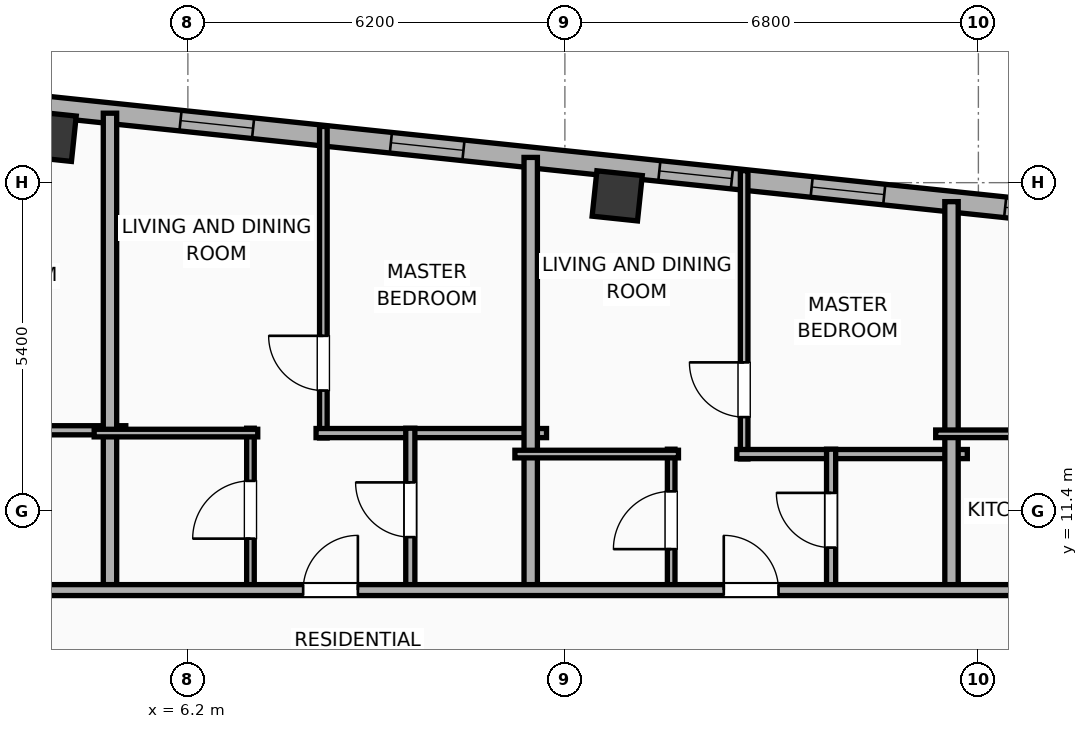
"""IFC4 building model, lengths in metres.
Left out: names, types, materials, properties, quantities, classifications, styles, units other than length and angle.
Written with IfcOpenShell. Run it as: python <this file> out.ifc"""

import sys

from ifc_helpers import new_model, si_unit, direction, frame, frame_2d, origin, origin_2d, place, context, subcontext, project, spatial, rectangle, hollow_rectangle, extrude, element, fill, save


model = new_model("IFC4")
c1 = context("Model", 3, precision=1e-05, world=origin(), true_north=direction((0.0, 1.0)))
c2 = subcontext(c1, "Body", "Model", "MODEL_VIEW")
j1 = project(units=[si_unit("LENGTHUNIT", "METRE"), si_unit("PLANEANGLEUNIT", "RADIAN")], contexts=[c1])
p1 = place(None, origin())
s1 = spatial("IfcSite", under=j1, at=p1, CompositionType="ELEMENT")
p2 = place(p1, origin())
s2 = spatial("IfcBuilding", under=s1, at=p2, CompositionType="ELEMENT")
p3 = place(p2, frame((0.0, 0.0, 271.7)))
s3 = spatial("IfcBuildingStorey", under=s2, at=p3, CompositionType="ELEMENT", Elevation=271.7)
for number, where, z_axis, x_axis in (
    (1, (13.26, 16.583, 0.0), (0.0, 0.0, 1.0), (0.995, -0.105, 0.0)),
    (2, (3.952, 17.561, 0.0), (0.0, 0.0, 1.0), (0.995, -0.105, 0.0)),
):
    element("IfcColumn", number, at=place(p3, frame(where, z_axis=z_axis, x_axis=x_axis)), inside=s3, PredefinedType="COLUMN", context=c2, shape_type="SweptSolid", body=[
        extrude(hollow_rectangle(XDim=0.75, YDim=0.75, WallThickness=0.025, at=origin_2d()), origin(), (0.0, 0.0, 1.0), 3.9),
    ])
p4 = place(p3, frame((-23.908, 20.972, 0.0), z_axis=(0.0, 0.0, 1.0), x_axis=(0.994521888554, -0.104528528102, 0.0)))
e3 = element("IfcWall", 3, at=p4, inside=s3, PredefinedType="ELEMENTEDWALL", context=c2, shape_type="SweptSolid", body=[
    extrude(rectangle(XDim=46.766, YDim=0.34, at=frame_2d((23.383, 0.0))), origin(), (0.0, 0.0, 1.0), 3.65),
])
p5 = place(p4, frame((5.744, 0.0, 0.75)))
e4 = element("IfcOpeningElement", 4, at=p5, cuts=e3, PredefinedType="OPENING", context=c2, shape_type="SweptSolid", body=[
    extrude(rectangle(XDim=2.4, YDim=2.1, at=frame_2d((1.2, 1.05))), frame((0.0, 0.18, 0.0), z_axis=(0.0, -1.0, 0.0), x_axis=(1.0, 0.0, 0.0)), (0.0, 0.0, 1.0), 0.36),
])
p6 = place(p4, frame((3.05, 0.0, 0.75)))
e5 = element("IfcOpeningElement", 5, at=p6, cuts=e3, PredefinedType="OPENING", context=c2, shape_type="SweptSolid", body=[
    extrude(rectangle(XDim=1.2, YDim=2.05, at=frame_2d((0.6, 1.025))), frame((0.0, 0.18, 0.0), z_axis=(0.0, -1.0, 0.0), x_axis=(1.0, 0.0, 0.0)), (0.0, 0.0, 1.0), 0.36),
])
p7 = place(p4, frame((9.957, 0.0, 0.75)))
e6 = element("IfcOpeningElement", 6, at=p7, cuts=e3, PredefinedType="OPENING", context=c2, shape_type="SweptSolid", body=[
    extrude(rectangle(XDim=1.2, YDim=2.05, at=frame_2d((0.6, 1.025))), frame((0.0, 0.18, 0.0), z_axis=(0.0, -1.0, 0.0), x_axis=(1.0, 0.0, 0.0)), (0.0, 0.0, 1.0), 0.36),
])
p8 = place(p4, frame((13.05, 0.0, 0.75)))
e7 = element("IfcOpeningElement", 7, at=p8, cuts=e3, PredefinedType="OPENING", context=c2, shape_type="SweptSolid", body=[
    extrude(rectangle(XDim=1.2, YDim=2.05, at=frame_2d((0.6, 1.025))), frame((0.0, 0.18, 0.0), z_axis=(0.0, -1.0, 0.0), x_axis=(1.0, 0.0, 0.0)), (0.0, 0.0, 1.0), 0.36),
])
p9 = place(p4, frame((16.383, 0.0, 0.75)))
e8 = element("IfcOpeningElement", 8, at=p9, cuts=e3, PredefinedType="OPENING", context=c2, shape_type="SweptSolid", body=[
    extrude(rectangle(XDim=1.2, YDim=2.05, at=frame_2d((0.6, 1.025))), frame((0.0, 0.18, 0.0), z_axis=(0.0, -1.0, 0.0), x_axis=(1.0, 0.0, 0.0)), (0.0, 0.0, 1.0), 0.36),
])
p10 = place(p4, frame((19.716, 0.0, 0.75)))
e9 = element("IfcOpeningElement", 9, at=p10, cuts=e3, PredefinedType="OPENING", context=c2, shape_type="SweptSolid", body=[
    extrude(rectangle(XDim=1.2, YDim=2.05, at=frame_2d((0.6, 1.025))), frame((0.0, 0.18, 0.0), z_axis=(0.0, -1.0, 0.0), x_axis=(1.0, 0.0, 0.0)), (0.0, 0.0, 1.0), 0.36),
])
p11 = place(p4, frame((23.195, 0.0, 0.75)))
e10 = element("IfcOpeningElement", 10, at=p11, cuts=e3, PredefinedType="OPENING", context=c2, shape_type="SweptSolid", body=[
    extrude(rectangle(XDim=1.2, YDim=2.05, at=frame_2d((0.6, 1.025))), frame((0.0, 0.18, 0.0), z_axis=(0.0, -1.0, 0.0), x_axis=(1.0, 0.0, 0.0)), (0.0, 0.0, 1.0), 0.36),
])
p12 = place(p4, frame((26.194, 0.0, 0.75)))
e11 = element("IfcOpeningElement", 11, at=p12, cuts=e3, PredefinedType="OPENING", context=c2, shape_type="SweptSolid", body=[
    extrude(rectangle(XDim=1.2, YDim=2.05, at=frame_2d((0.6, 1.025))), frame((0.0, 0.18, 0.0), z_axis=(0.0, -1.0, 0.0), x_axis=(1.0, 0.0, 0.0)), (0.0, 0.0, 1.0), 0.36),
])
p13 = place(p4, frame((30.152, 0.0, 0.75)))
e12 = element("IfcOpeningElement", 12, at=p13, cuts=e3, PredefinedType="OPENING", context=c2, shape_type="SweptSolid", body=[
    extrude(rectangle(XDim=1.2, YDim=2.05, at=frame_2d((0.6, 1.025))), frame((0.0, 0.18, 0.0), z_axis=(0.0, -1.0, 0.0), x_axis=(1.0, 0.0, 0.0)), (0.0, 0.0, 1.0), 0.36),
])
p14 = place(p4, frame((33.631, 0.0, 0.75)))
e13 = element("IfcOpeningElement", 13, at=p14, cuts=e3, PredefinedType="OPENING", context=c2, shape_type="SweptSolid", body=[
    extrude(rectangle(XDim=1.2, YDim=2.05, at=frame_2d((0.6, 1.025))), frame((0.0, 0.18, 0.0), z_axis=(0.0, -1.0, 0.0), x_axis=(1.0, 0.0, 0.0)), (0.0, 0.0, 1.0), 0.36),
])
p15 = place(p4, frame((38.07, 0.0, 0.75)))
e14 = element("IfcOpeningElement", 14, at=p15, cuts=e3, PredefinedType="OPENING", context=c2, shape_type="SweptSolid", body=[
    extrude(rectangle(XDim=1.2, YDim=2.05, at=frame_2d((0.6, 1.025))), frame((0.0, 0.18, 0.0), z_axis=(0.0, -1.0, 0.0), x_axis=(1.0, 0.0, 0.0)), (0.0, 0.0, 1.0), 0.36),
])
p16 = place(p4, frame((40.589, 0.0, 0.75)))
e15 = element("IfcOpeningElement", 15, at=p16, cuts=e3, PredefinedType="OPENING", context=c2, shape_type="SweptSolid", body=[
    extrude(rectangle(XDim=1.2, YDim=2.05, at=frame_2d((0.6, 1.025))), frame((0.0, 0.18, 0.0), z_axis=(0.0, -1.0, 0.0), x_axis=(1.0, 0.0, 0.0)), (0.0, 0.0, 1.0), 0.36),
])
p17 = place(p4, frame((43.789, 0.0, 0.75)))
e16 = element("IfcOpeningElement", 16, at=p17, cuts=e3, PredefinedType="OPENING", context=c2, shape_type="SweptSolid", body=[
    extrude(rectangle(XDim=1.2, YDim=2.05, at=frame_2d((0.6, 1.025))), frame((0.0, 0.18, 0.0), z_axis=(0.0, -1.0, 0.0), x_axis=(1.0, 0.0, 0.0)), (0.0, 0.0, 1.0), 0.36),
])
p18 = place(p3, frame((1.389, 12.728, 0.0), z_axis=(0.0, 0.0, 1.0), x_axis=(1.0, 0.0, 0.0)))
e17 = element("IfcWall", 17, at=p18, inside=s3, PredefinedType="PLUMBINGWALL", context=c2, shape_type="SweptSolid", body=[
    extrude(rectangle(XDim=3.79, YDim=0.15, at=frame_2d((1.895, 0.0))), origin(), (0.0, 0.0, 1.0), 3.65),
])
p19 = place(p3, frame((4.919, 10.02, 0.0), z_axis=(0.0, 0.0, 1.0), x_axis=(0.0, 1.0, 0.0)))
e18 = element("IfcWall", 18, at=p19, inside=s3, PredefinedType="PARTITIONING", context=c2, shape_type="SweptSolid", body=[
    extrude(rectangle(XDim=7.922, YDim=0.22, at=frame_2d((3.961, 0.0))), origin(), (0.0, 0.0, 1.0), 3.65),
])
p20 = place(p3, frame((8.428, 12.602, 0.0), z_axis=(0.0, 0.0, 1.0), x_axis=(0.0, 1.0, 0.0)))
e19 = element("IfcWall", 19, at=p20, inside=s3, PredefinedType="PARTITIONING", context=c2, shape_type="SweptSolid", body=[
    extrude(rectangle(XDim=5.122, YDim=0.125, at=frame_2d((2.561, 0.0))), origin(), (0.0, 0.0, 1.0), 3.65),
])
p21 = place(p20, frame((0.779, 0.0, 0.0)))
e20 = element("IfcOpeningElement", 20, at=p21, cuts=e19, PredefinedType="OPENING", context=c2, shape_type="SweptSolid", body=[
    extrude(rectangle(XDim=0.9, YDim=2.05, at=frame_2d((0.45, 1.025))), frame((0.0, 0.073, 0.0), z_axis=(0.0, -1.0, 0.0), x_axis=(1.0, 0.0, 0.0)), (0.0, 0.0, 1.0), 0.145),
])
p22 = place(p3, frame((8.308, 12.682, 0.0), z_axis=(0.0, 0.0, 1.0), x_axis=(1.0, 0.0, 0.0)))
e21 = element("IfcWall", 21, at=p22, inside=s3, PredefinedType="PLUMBINGWALL", context=c2, shape_type="SweptSolid", body=[
    extrude(rectangle(XDim=3.79, YDim=0.15, at=frame_2d((1.895, 0.0))), origin(), (0.0, 0.0, 1.0), 3.65),
])
p23 = place(p3, frame((7.229, 10.08, 0.0), z_axis=(0.0, 0.0, 1.0), x_axis=(0.0, 1.0, 0.0)))
e22 = element("IfcWall", 22, at=p23, inside=s3, PredefinedType="PARTITIONING", context=c2, shape_type="SweptSolid", body=[
    extrude(rectangle(XDim=2.682, YDim=0.125, at=frame_2d((1.341, 0.0))), origin(), (0.0, 0.0, 1.0), 3.65),
])
p24 = place(p23, frame((0.866, 0.0, 0.0)))
e23 = element("IfcOpeningElement", 23, at=p24, cuts=e22, PredefinedType="OPENING", context=c2, shape_type="SweptSolid", body=[
    extrude(rectangle(XDim=0.95, YDim=2.05, at=frame_2d((0.475, 1.025))), frame((0.0, 0.073, 0.0), z_axis=(0.0, -1.0, 0.0), x_axis=(1.0, 0.0, 0.0)), (0.0, 0.0, 1.0), 0.145),
])
p25 = place(p3, frame((4.659, 12.682, 0.0), z_axis=(0.0, 0.0, 1.0), x_axis=(1.0, 0.0, 0.0)))
e24 = element("IfcWall", 24, at=p25, inside=s3, PredefinedType="PARTITIONING", context=c2, shape_type="SweptSolid", body=[
    extrude(rectangle(XDim=2.69, YDim=0.125, at=frame_2d((1.345, 0.0))), origin(), (0.0, 0.0, 1.0), 3.65),
])
p26 = place(p3, frame((9.858, 10.08, 0.0), z_axis=(0.0, 0.0, 1.0), x_axis=(0.0, 1.0, 0.0)))
e25 = element("IfcWall", 25, at=p26, inside=s3, PredefinedType="PLUMBINGWALL", context=c2, shape_type="SweptSolid", body=[
    extrude(rectangle(XDim=2.682, YDim=0.15, at=frame_2d((1.341, 0.0))), origin(), (0.0, 0.0, 1.0), 3.65),
])
p27 = place(p26, frame((0.891, 0.0, 0.0)))
e26 = element("IfcOpeningElement", 26, at=p27, cuts=e25, PredefinedType="OPENING", context=c2, shape_type="SweptSolid", body=[
    extrude(rectangle(XDim=0.9, YDim=2.05, at=frame_2d((0.45, 1.025))), frame((0.0, 0.085, 0.0), z_axis=(0.0, -1.0, 0.0), x_axis=(1.0, 0.0, 0.0)), (0.0, 0.0, 1.0), 0.17),
])
p28 = place(p3, frame((11.838, 10.02, 0.0), z_axis=(0.0, 0.0, 1.0), x_axis=(0.0, 1.0, 0.0)))
e27 = element("IfcWall", 27, at=p28, inside=s3, PredefinedType="PARTITIONING", context=c2, shape_type="SweptSolid", body=[
    extrude(rectangle(XDim=7.195, YDim=0.22, at=frame_2d((3.598, 0.0))), origin(), (0.0, 0.0, 1.0), 3.65),
])
p29 = place(p3, frame((15.348, 12.257, 0.0), z_axis=(0.0, 0.0, 1.0), x_axis=(0.0, 1.0, 0.0)))
e28 = element("IfcWall", 28, at=p29, inside=s3, PredefinedType="PARTITIONING", context=c2, shape_type="SweptSolid", body=[
    extrude(rectangle(XDim=4.74, YDim=0.125, at=frame_2d((2.37, 0.0))), origin(), (0.0, 0.0, 1.0), 3.65),
])
p30 = place(p29, frame((0.688, 0.0, 0.0)))
e29 = element("IfcOpeningElement", 29, at=p30, cuts=e28, PredefinedType="OPENING", context=c2, shape_type="SweptSolid", body=[
    extrude(rectangle(XDim=0.9, YDim=2.05, at=frame_2d((0.45, 1.025))), frame((0.0, 0.073, 0.0), z_axis=(0.0, -1.0, 0.0), x_axis=(1.0, 0.0, 0.0)), (0.0, 0.0, 1.0), 0.145),
])
p31 = place(p3, frame((15.228, 12.337, 0.0), z_axis=(0.0, 0.0, 1.0), x_axis=(1.0, 0.0, 0.0)))
e30 = element("IfcWall", 30, at=p31, inside=s3, PredefinedType="PLUMBINGWALL", context=c2, shape_type="SweptSolid", body=[
    extrude(rectangle(XDim=3.79, YDim=0.15, at=frame_2d((1.895, 0.0))), origin(), (0.0, 0.0, 1.0), 3.65),
])
p32 = place(p3, frame((14.148, 10.08, 0.0), z_axis=(0.0, 0.0, 1.0), x_axis=(0.0, 1.0, 0.0)))
e31 = element("IfcWall", 31, at=p32, inside=s3, PredefinedType="PARTITIONING", context=c2, shape_type="SweptSolid", body=[
    extrude(rectangle(XDim=2.337, YDim=0.125, at=frame_2d((1.168, 0.0))), origin(), (0.0, 0.0, 1.0), 3.65),
])
p33 = place(p32, frame((0.694, 0.0, 0.0)))
e32 = element("IfcOpeningElement", 32, at=p33, cuts=e31, PredefinedType="OPENING", context=c2, shape_type="SweptSolid", body=[
    extrude(rectangle(XDim=0.95, YDim=2.05, at=frame_2d((0.475, 1.025))), frame((0.0, 0.073, 0.0), z_axis=(0.0, -1.0, 0.0), x_axis=(1.0, 0.0, 0.0)), (0.0, 0.0, 1.0), 0.145),
])
p34 = place(p3, frame((11.578, 12.337, 0.0), z_axis=(0.0, 0.0, 1.0), x_axis=(1.0, 0.0, 0.0)))
e33 = element("IfcWall", 33, at=p34, inside=s3, PredefinedType="PARTITIONING", context=c2, shape_type="SweptSolid", body=[
    extrude(rectangle(XDim=2.69, YDim=0.125, at=frame_2d((1.345, 0.0))), origin(), (0.0, 0.0, 1.0), 3.65),
])
p35 = place(p3, frame((16.778, 10.08, 0.0), z_axis=(0.0, 0.0, 1.0), x_axis=(0.0, 1.0, 0.0)))
e34 = element("IfcWall", 34, at=p35, inside=s3, PredefinedType="PLUMBINGWALL", context=c2, shape_type="SweptSolid", body=[
    extrude(rectangle(XDim=2.337, YDim=0.15, at=frame_2d((1.168, 0.0))), origin(), (0.0, 0.0, 1.0), 3.65),
])
p36 = place(p35, frame((0.719, 0.0, 0.0)))
e35 = element("IfcOpeningElement", 35, at=p36, cuts=e34, PredefinedType="OPENING", context=c2, shape_type="SweptSolid", body=[
    extrude(rectangle(XDim=0.9, YDim=2.05, at=frame_2d((0.45, 1.025))), frame((0.0, 0.085, 0.0), z_axis=(0.0, -1.0, 0.0), x_axis=(1.0, 0.0, 0.0)), (0.0, 0.0, 1.0), 0.17),
])
p37 = place(p3, frame((18.758, 10.02, 0.0), z_axis=(0.0, 0.0, 1.0), x_axis=(0.0, 1.0, 0.0)))
e36 = element("IfcWall", 36, at=p37, inside=s3, PredefinedType="PARTITIONING", context=c2, shape_type="SweptSolid", body=[
    extrude(rectangle(XDim=6.468, YDim=0.22, at=frame_2d((3.234, 0.0))), origin(), (0.0, 0.0, 1.0), 3.65),
])
p38 = place(p3, frame((18.498, 12.67, 0.0), z_axis=(0.0, 0.0, 1.0), x_axis=(1.0, 0.0, 0.0)))
e37 = element("IfcWall", 37, at=p38, inside=s3, PredefinedType="PARTITIONING", context=c2, shape_type="SweptSolid", body=[
    extrude(rectangle(XDim=2.986, YDim=0.125, at=frame_2d((1.493, 0.0))), origin(), (0.0, 0.0, 1.0), 3.65),
])
p39 = place(p3, frame((-28.516, 10.1, 0.0), z_axis=(0.0, 0.0, 1.0), x_axis=(1.0, 0.0, 0.0)))
e38 = element("IfcWall", 38, at=p39, inside=s3, PredefinedType="PARTITIONING", context=c2, shape_type="SweptSolid", body=[
    extrude(rectangle(XDim=53.955, YDim=0.18, at=frame_2d((26.978, 0.0))), origin(), (0.0, 0.0, 1.0), 3.65),
])
p40 = place(p39, frame((2.998, 0.0, 0.0)))
e39 = element("IfcOpeningElement", 39, at=p40, cuts=e38, PredefinedType="OPENING", context=c2, shape_type="SweptSolid", body=[
    extrude(rectangle(XDim=0.9, YDim=2.05, at=frame_2d((0.45, 1.025))), frame((0.0, 0.1, 0.0), z_axis=(0.0, -1.0, 0.0), x_axis=(1.0, 0.0, 0.0)), (0.0, 0.0, 1.0), 0.2),
])
p41 = place(p39, frame((9.656, 0.0, 0.0)))
e40 = element("IfcOpeningElement", 40, at=p41, cuts=e38, PredefinedType="OPENING", context=c2, shape_type="SweptSolid", body=[
    extrude(rectangle(XDim=0.9, YDim=2.05, at=frame_2d((0.45, 1.025))), frame((0.0, 0.1, 0.0), z_axis=(0.0, -1.0, 0.0), x_axis=(1.0, 0.0, 0.0)), (0.0, 0.0, 1.0), 0.2),
])
p42 = place(p39, frame((16.287, 0.0, 0.0)))
e41 = element("IfcOpeningElement", 41, at=p42, cuts=e38, PredefinedType="OPENING", context=c2, shape_type="SweptSolid", body=[
    extrude(rectangle(XDim=0.9, YDim=2.05, at=frame_2d((0.45, 1.025))), frame((0.0, 0.1, 0.0), z_axis=(0.0, -1.0, 0.0), x_axis=(1.0, 0.0, 0.0)), (0.0, 0.0, 1.0), 0.2),
])
p43 = place(p39, frame((22.918, 0.0, 0.0)))
e42 = element("IfcOpeningElement", 42, at=p43, cuts=e38, PredefinedType="OPENING", context=c2, shape_type="SweptSolid", body=[
    extrude(rectangle(XDim=0.9, YDim=2.05, at=frame_2d((0.45, 1.025))), frame((0.0, 0.1, 0.0), z_axis=(0.0, -1.0, 0.0), x_axis=(1.0, 0.0, 0.0)), (0.0, 0.0, 1.0), 0.2),
])
p44 = place(p39, frame((29.689, 0.0, 0.0)))
e43 = element("IfcOpeningElement", 43, at=p44, cuts=e38, PredefinedType="OPENING", context=c2, shape_type="SweptSolid", body=[
    extrude(rectangle(XDim=0.9, YDim=2.05, at=frame_2d((0.45, 1.025))), frame((0.0, 0.1, 0.0), z_axis=(0.0, -1.0, 0.0), x_axis=(1.0, 0.0, 0.0)), (0.0, 0.0, 1.0), 0.2),
])
p45 = place(p39, frame((36.612, 0.0, 0.0)))
e44 = element("IfcOpeningElement", 44, at=p45, cuts=e38, PredefinedType="OPENING", context=c2, shape_type="SweptSolid", body=[
    extrude(rectangle(XDim=0.9, YDim=2.05, at=frame_2d((0.45, 1.025))), frame((0.0, 0.1, 0.0), z_axis=(0.0, -1.0, 0.0), x_axis=(1.0, 0.0, 0.0)), (0.0, 0.0, 1.0), 0.2),
])
p46 = place(p39, frame((43.529, 0.0, 0.0)))
e45 = element("IfcOpeningElement", 45, at=p46, cuts=e38, PredefinedType="OPENING", context=c2, shape_type="SweptSolid", body=[
    extrude(rectangle(XDim=0.9, YDim=2.05, at=frame_2d((0.45, 1.025))), frame((0.0, 0.1, 0.0), z_axis=(0.0, -1.0, 0.0), x_axis=(1.0, 0.0, 0.0)), (0.0, 0.0, 1.0), 0.2),
])
p47 = place(p39, frame((50.452, 0.0, 0.0)))
e46 = element("IfcOpeningElement", 46, at=p47, cuts=e38, PredefinedType="OPENING", context=c2, shape_type="SweptSolid", body=[
    extrude(rectangle(XDim=0.9, YDim=2.05, at=frame_2d((0.45, 1.025))), frame((0.0, 0.1, 0.0), z_axis=(0.0, -1.0, 0.0), x_axis=(1.0, 0.0, 0.0)), (0.0, 0.0, 1.0), 0.2),
])
p48 = place(p13, origin())
e47 = element("IfcWindow", 47, at=p48, inside=s3, PartitioningType="SINGLE_PANEL", PredefinedType="WINDOW", context=c2, shape_type="SweptSolid", body=[
    extrude(rectangle(XDim=1.2, YDim=2.05, at=frame_2d((0.6, 1.025))), frame((0.0, 0.03, 0.0), z_axis=(0.0, -1.0, 0.0), x_axis=(1.0, 0.0, 0.0)), (0.0, 0.0, 1.0), 0.06),
])
fill(e12, e47)
p49 = place(p14, origin())
e48 = element("IfcWindow", 48, at=p49, inside=s3, PartitioningType="SINGLE_PANEL", PredefinedType="WINDOW", context=c2, shape_type="SweptSolid", body=[
    extrude(rectangle(XDim=1.2, YDim=2.05, at=frame_2d((0.6, 1.025))), frame((0.0, 0.03, 0.0), z_axis=(0.0, -1.0, 0.0), x_axis=(1.0, 0.0, 0.0)), (0.0, 0.0, 1.0), 0.06),
])
fill(e13, e48)
p50 = place(p15, origin())
e49 = element("IfcWindow", 49, at=p50, inside=s3, PartitioningType="SINGLE_PANEL", PredefinedType="WINDOW", context=c2, shape_type="SweptSolid", body=[
    extrude(rectangle(XDim=1.2, YDim=2.05, at=frame_2d((0.6, 1.025))), frame((0.0, 0.03, 0.0), z_axis=(0.0, -1.0, 0.0), x_axis=(1.0, 0.0, 0.0)), (0.0, 0.0, 1.0), 0.06),
])
fill(e14, e49)
p51 = place(p16, origin())
e50 = element("IfcWindow", 50, at=p51, inside=s3, PartitioningType="SINGLE_PANEL", PredefinedType="WINDOW", context=c2, shape_type="SweptSolid", body=[
    extrude(rectangle(XDim=1.2, YDim=2.05, at=frame_2d((0.6, 1.025))), frame((0.0, 0.03, 0.0), z_axis=(0.0, -1.0, 0.0), x_axis=(1.0, 0.0, 0.0)), (0.0, 0.0, 1.0), 0.06),
])
fill(e15, e50)
p52 = place(p17, origin())
e51 = element("IfcWindow", 51, at=p52, inside=s3, PartitioningType="SINGLE_PANEL", PredefinedType="WINDOW", context=c2, shape_type="SweptSolid", body=[
    extrude(rectangle(XDim=1.2, YDim=2.05, at=frame_2d((0.6, 1.025))), frame((0.0, 0.03, 0.0), z_axis=(0.0, -1.0, 0.0), x_axis=(1.0, 0.0, 0.0)), (0.0, 0.0, 1.0), 0.06),
])
fill(e16, e51)
p53 = place(p21, origin())
e52 = element("IfcDoor", 52, at=p53, inside=s3, OperationType="SINGLE_SWING_RIGHT", PredefinedType="DOOR", context=c2, shape_type="SweptSolid", body=[
    extrude(rectangle(XDim=0.9, YDim=2.05, at=frame_2d((0.45, 1.025))), frame((0.0, 0.025, 0.0), z_axis=(0.0, -1.0, 0.0), x_axis=(1.0, 0.0, 0.0)), (0.0, 0.0, 1.0), 0.05),
])
fill(e20, e52)
p54 = place(p24, origin())
e53 = element("IfcDoor", 53, at=p54, inside=s3, OperationType="SINGLE_SWING_LEFT", PredefinedType="DOOR", context=c2, shape_type="SweptSolid", body=[
    extrude(rectangle(XDim=0.95, YDim=2.05, at=frame_2d((0.475, 1.025))), frame((0.0, 0.025, 0.0), z_axis=(0.0, -1.0, 0.0), x_axis=(1.0, 0.0, 0.0)), (0.0, 0.0, 1.0), 0.05),
])
fill(e23, e53)
p55 = place(p27, origin())
e54 = element("IfcDoor", 54, at=p55, inside=s3, OperationType="SINGLE_SWING_RIGHT", PredefinedType="DOOR", context=c2, shape_type="SweptSolid", body=[
    extrude(rectangle(XDim=0.9, YDim=2.05, at=frame_2d((0.45, 1.025))), frame((0.0, 0.025, 0.0), z_axis=(0.0, -1.0, 0.0), x_axis=(1.0, 0.0, 0.0)), (0.0, 0.0, 1.0), 0.05),
])
fill(e26, e54)
p56 = place(p30, origin())
e55 = element("IfcDoor", 55, at=p56, inside=s3, OperationType="SINGLE_SWING_RIGHT", PredefinedType="DOOR", context=c2, shape_type="SweptSolid", body=[
    extrude(rectangle(XDim=0.9, YDim=2.05, at=frame_2d((0.45, 1.025))), frame((0.0, 0.025, 0.0), z_axis=(0.0, -1.0, 0.0), x_axis=(1.0, 0.0, 0.0)), (0.0, 0.0, 1.0), 0.05),
])
fill(e29, e55)
p57 = place(p33, origin())
e56 = element("IfcDoor", 56, at=p57, inside=s3, OperationType="SINGLE_SWING_LEFT", PredefinedType="DOOR", context=c2, shape_type="SweptSolid", body=[
    extrude(rectangle(XDim=0.95, YDim=2.05, at=frame_2d((0.475, 1.025))), frame((0.0, 0.025, 0.0), z_axis=(0.0, -1.0, 0.0), x_axis=(1.0, 0.0, 0.0)), (0.0, 0.0, 1.0), 0.05),
])
fill(e32, e56)
p58 = place(p36, origin())
e57 = element("IfcDoor", 57, at=p58, inside=s3, OperationType="SINGLE_SWING_RIGHT", PredefinedType="DOOR", context=c2, shape_type="SweptSolid", body=[
    extrude(rectangle(XDim=0.9, YDim=2.05, at=frame_2d((0.45, 1.025))), frame((0.0, 0.025, 0.0), z_axis=(0.0, -1.0, 0.0), x_axis=(1.0, 0.0, 0.0)), (0.0, 0.0, 1.0), 0.05),
])
fill(e35, e57)
p59 = place(p45, origin())
e58 = element("IfcDoor", 58, at=p59, inside=s3, OperationType="SINGLE_SWING_RIGHT", PredefinedType="DOOR", context=c2, shape_type="SweptSolid", body=[
    extrude(rectangle(XDim=0.9, YDim=2.05, at=frame_2d((0.45, 1.025))), frame((0.0, 0.025, 0.0), z_axis=(0.0, -1.0, 0.0), x_axis=(1.0, 0.0, 0.0)), (0.0, 0.0, 1.0), 0.05),
])
fill(e44, e58)
p60 = place(p46, origin())
e59 = element("IfcDoor", 59, at=p60, inside=s3, OperationType="SINGLE_SWING_LEFT", PredefinedType="DOOR", context=c2, shape_type="SweptSolid", body=[
    extrude(rectangle(XDim=0.9, YDim=2.05, at=frame_2d((0.45, 1.025))), frame((0.0, 0.025, 0.0), z_axis=(0.0, -1.0, 0.0), x_axis=(1.0, 0.0, 0.0)), (0.0, 0.0, 1.0), 0.05),
])
fill(e45, e59)
save(model, sys.argv[1])
